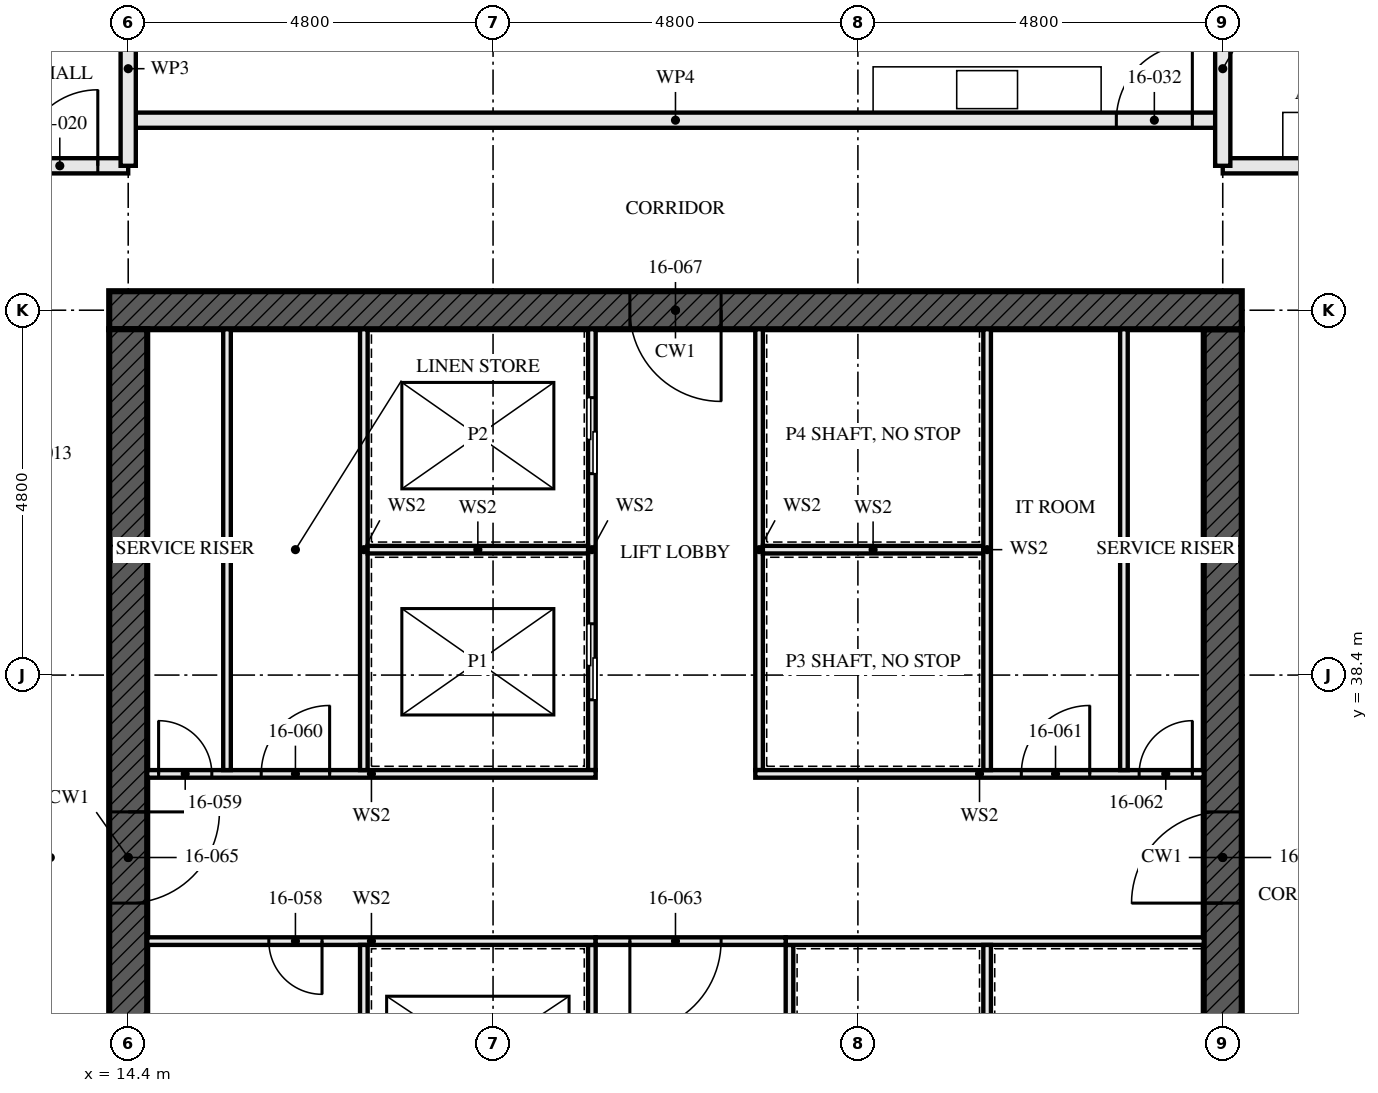
"""IFC4 building model, lengths in metres.
Left out: names, types, materials, properties, quantities, classifications, styles, units other than length and angle.
Written with IfcOpenShell. Run it as: python <this file> out.ifc"""

import sys

from ifc_helpers import new_model, si_unit, direction, frame, frame_2d, origin, place, context, subcontext, project, spatial, rectangle, extrude, element, fill, save


model = new_model("IFC4")
c1 = context("Model", 3, precision=1e-05, world=origin(), true_north=direction((0.0, 1.0)))
c2 = subcontext(c1, "Body", "Model", "MODEL_VIEW")
j1 = project(units=[si_unit("LENGTHUNIT", "METRE"), si_unit("PLANEANGLEUNIT", "RADIAN")], contexts=[c1])
p1 = place(None, origin())
s1 = spatial("IfcSite", under=j1, at=p1, CompositionType="ELEMENT")
p2 = place(p1, origin())
s2 = spatial("IfcBuilding", under=s1, at=p2, CompositionType="ELEMENT")
p3 = place(p2, frame((0.0, 0.0, 62.0)))
s3 = spatial("IfcBuildingStorey", under=s2, at=p3, CompositionType="ELEMENT", Elevation=62.0)
p4 = place(p3, frame((29.05, 43.2, -0.17), z_axis=(0.0, 0.0, 1.0), x_axis=(-1.0, 0.0, 0.0)))
e1 = element("IfcWall", 1, at=p4, inside=s3, PredefinedType="SHEAR", context=c2, shape_type="SweptSolid", body=[
    extrude(rectangle(XDim=14.9, YDim=0.5, at=frame_2d((7.45, 0.0))), origin(), (0.0, 0.0, 1.0), 3.5),
])
p5 = place(p4, frame((6.85, 0.0, 0.17)))
e2 = element("IfcOpeningElement", 2, at=p5, cuts=e1, PredefinedType="OPENING", context=c2, shape_type="SweptSolid", body=[
    extrude(rectangle(XDim=1.2, YDim=2.1, at=frame_2d((0.6, 1.05))), frame((0.0, 0.26, 0.0), z_axis=(0.0, -1.0, 0.0), x_axis=(1.0, 0.0, 0.0)), (0.0, 0.0, 1.0), 0.521),
])
p6 = place(p3, frame((14.4, 42.95, -0.17), z_axis=(0.0, 0.0, 1.0), x_axis=(0.0, -1.0, 0.0)))
e3 = element("IfcWall", 3, at=p6, inside=s3, PredefinedType="SHEAR", context=c2, shape_type="SweptSolid", body=[
    extrude(rectangle(XDim=13.9, YDim=0.5, at=frame_2d((6.95, 0.0))), origin(), (0.0, 0.0, 1.0), 3.5),
])
p7 = place(p6, frame((6.35, 0.0, 0.17)))
e4 = element("IfcOpeningElement", 4, at=p7, cuts=e3, PredefinedType="OPENING", context=c2, shape_type="SweptSolid", body=[
    extrude(rectangle(XDim=1.2, YDim=2.1, at=frame_2d((0.6, 1.05))), frame((0.0, 0.26, 0.0), z_axis=(0.0, -1.0, 0.0), x_axis=(1.0, 0.0, 0.0)), (0.0, 0.0, 1.0), 0.521),
])
p8 = place(p3, frame((28.8, 29.05, -0.17), z_axis=(0.0, 0.0, 1.0), x_axis=(0.0, 1.0, 0.0)))
e5 = element("IfcWall", 5, at=p8, inside=s3, PredefinedType="SHEAR", context=c2, shape_type="SweptSolid", body=[
    extrude(rectangle(XDim=13.9, YDim=0.5, at=frame_2d((6.95, 0.0))), origin(), (0.0, 0.0, 1.0), 3.5),
])
p9 = place(p8, frame((6.35, 0.0, 0.17)))
e6 = element("IfcOpeningElement", 6, at=p9, cuts=e5, PredefinedType="OPENING", context=c2, shape_type="SweptSolid", body=[
    extrude(rectangle(XDim=1.2, YDim=2.1, at=frame_2d((0.6, 1.05))), frame((0.0, 0.26, 0.0), z_axis=(0.0, -1.0, 0.0), x_axis=(1.0, 0.0, 0.0)), (0.0, 0.0, 1.0), 0.521),
])
p10 = place(p3, frame((14.4, 45.1, 0.0), z_axis=(0.0, 0.0, 1.0), x_axis=(-1.0, 0.0, 0.0)))
e7 = element("IfcWall", 7, at=p10, inside=s3, PredefinedType="PARTITIONING", context=c2, shape_type="SweptSolid", body=[
    extrude(rectangle(XDim=9.6, YDim=0.2, at=frame_2d((4.8, 0.0))), origin(), (0.0, 0.0, 1.0), 3.33),
])
p11 = place(p10, frame((0.4, 0.0, 0.0)))
e8 = element("IfcOpeningElement", 8, at=p11, cuts=e7, PredefinedType="OPENING", context=c2, shape_type="SweptSolid", body=[
    extrude(rectangle(XDim=1.0, YDim=2.1, at=frame_2d((0.5, 1.05))), frame((0.0, 0.111, 0.0), z_axis=(0.0, -1.0, 0.0), x_axis=(1.0, 0.0, 0.0)), (0.0, 0.0, 1.0), 0.221),
])
p12 = place(p3, frame((28.8, 45.7, 0.0), z_axis=(0.0, 0.0, 1.0), x_axis=(-1.0, 0.0, 0.0)))
e9 = element("IfcWall", 9, at=p12, inside=s3, PredefinedType="PARTITIONING", context=c2, shape_type="SweptSolid", body=[
    extrude(rectangle(XDim=14.4, YDim=0.2, at=frame_2d((7.2, 0.0))), origin(), (0.0, 0.0, 1.0), 3.33),
])
p13 = place(p12, frame((0.4, 0.0, 0.0)))
e10 = element("IfcOpeningElement", 10, at=p13, cuts=e9, PredefinedType="OPENING", context=c2, shape_type="SweptSolid", body=[
    extrude(rectangle(XDim=1.0, YDim=2.1, at=frame_2d((0.5, 1.05))), frame((0.0, 0.111, 0.0), z_axis=(0.0, -1.0, 0.0), x_axis=(1.0, 0.0, 0.0)), (0.0, 0.0, 1.0), 0.221),
])
p14 = place(p3, frame((38.4, 45.1, 0.0), z_axis=(0.0, 0.0, 1.0), x_axis=(-1.0, 0.0, 0.0)))
e11 = element("IfcWall", 11, at=p14, inside=s3, PredefinedType="PARTITIONING", context=c2, shape_type="SweptSolid", body=[
    extrude(rectangle(XDim=9.6, YDim=0.2, at=frame_2d((4.8, 0.0))), origin(), (0.0, 0.0, 1.0), 3.33),
])
p15 = place(p14, frame((0.4, 0.0, 0.0)))
e12 = element("IfcOpeningElement", 12, at=p15, cuts=e11, PredefinedType="OPENING", context=c2, shape_type="SweptSolid", body=[
    extrude(rectangle(XDim=1.0, YDim=2.1, at=frame_2d((0.5, 1.05))), frame((0.0, 0.111, 0.0), z_axis=(0.0, -1.0, 0.0), x_axis=(1.0, 0.0, 0.0)), (0.0, 0.0, 1.0), 0.221),
])
for number, where, z_axis, x_axis in (
    (13, (15.7, 37.15, 0.0), (0.0, 0.0, 1.0), (0.0, 1.0, 0.0)),
    (14, (27.5, 37.15, 0.0), (0.0, 0.0, 1.0), (0.0, 1.0, 0.0)),
):
    element("IfcWall", number, at=place(p3, frame(where, z_axis=z_axis, x_axis=x_axis)), inside=s3, PredefinedType="SOLIDWALL", context=c2, shape_type="SweptSolid", body=[
        extrude(rectangle(XDim=5.8, YDim=0.1, at=frame_2d((2.9, 0.0))), origin(), (0.0, 0.0, 1.0), 3.33),
    ])
p16 = place(p3, frame((20.5, 29.05, 0.0), z_axis=(0.0, 0.0, 1.0), x_axis=(0.0, 1.0, 0.0)))
e15 = element("IfcWall", 15, at=p16, inside=s3, PredefinedType="SOLIDWALL", context=c2, shape_type="SweptSolid", body=[
    extrude(rectangle(XDim=5.8, YDim=0.1, at=frame_2d((2.9, 0.0))), origin(), (0.0, 0.0, 1.0), 3.33),
])
p17 = place(p16, frame((0.8, 0.0, 0.0)))
e16 = element("IfcOpeningElement", 16, at=p17, cuts=e15, PredefinedType="OPENING", context=c2, shape_type="SweptSolid", body=[
    extrude(rectangle(XDim=1.1, YDim=2.3, at=frame_2d((0.55, 1.15))), frame((0.0, 0.061, 0.0), z_axis=(0.0, -1.0, 0.0), x_axis=(1.0, 0.0, 0.0)), (0.0, 0.0, 1.0), 0.121),
])
p18 = place(p16, frame((3.775, 0.0, 0.0)))
e17 = element("IfcOpeningElement", 17, at=p18, cuts=e15, PredefinedType="OPENING", context=c2, shape_type="SweptSolid", body=[
    extrude(rectangle(XDim=1.1, YDim=2.3, at=frame_2d((0.55, 1.15))), frame((0.0, 0.061, 0.0), z_axis=(0.0, -1.0, 0.0), x_axis=(1.0, 0.0, 0.0)), (0.0, 0.0, 1.0), 0.121),
])
p19 = place(p3, frame((20.5, 37.15, 0.0), z_axis=(0.0, 0.0, 1.0), x_axis=(0.0, 1.0, 0.0)))
e18 = element("IfcWall", 18, at=p19, inside=s3, PredefinedType="SOLIDWALL", context=c2, shape_type="SweptSolid", body=[
    extrude(rectangle(XDim=5.8, YDim=0.1, at=frame_2d((2.9, 0.0))), origin(), (0.0, 0.0, 1.0), 3.33),
])
p20 = place(p19, frame((0.925, 0.0, 0.0)))
e19 = element("IfcOpeningElement", 19, at=p20, cuts=e18, PredefinedType="OPENING", context=c2, shape_type="SweptSolid", body=[
    extrude(rectangle(XDim=1.0, YDim=2.1, at=frame_2d((0.5, 1.05))), frame((0.0, 0.061, 0.0), z_axis=(0.0, -1.0, 0.0), x_axis=(1.0, 0.0, 0.0)), (0.0, 0.0, 1.0), 0.121),
])
p21 = place(p19, frame((3.9, 0.0, 0.0)))
e20 = element("IfcOpeningElement", 20, at=p21, cuts=e18, PredefinedType="OPENING", context=c2, shape_type="SweptSolid", body=[
    extrude(rectangle(XDim=1.0, YDim=2.1, at=frame_2d((0.5, 1.05))), frame((0.0, 0.061, 0.0), z_axis=(0.0, -1.0, 0.0), x_axis=(1.0, 0.0, 0.0)), (0.0, 0.0, 1.0), 0.121),
])
p22 = place(p3, frame((22.7, 37.15, 0.0), z_axis=(0.0, 0.0, 1.0), x_axis=(0.0, 1.0, 0.0)))
e21 = element("IfcWall", 21, at=p22, inside=s3, PredefinedType="SOLIDWALL", context=c2, shape_type="SweptSolid", body=[
    extrude(rectangle(XDim=5.8, YDim=0.1, at=frame_2d((2.9, 0.0))), origin(), (0.0, 0.0, 1.0), 3.33),
])
p23 = place(p3, frame((23.1, 29.05, 0.0), z_axis=(0.0, 0.0, 1.0), x_axis=(0.0, 1.0, 0.0)))
e22 = element("IfcWall", 22, at=p23, inside=s3, PredefinedType="SOLIDWALL", context=c2, shape_type="SweptSolid", body=[
    extrude(rectangle(XDim=5.8, YDim=0.1, at=frame_2d((2.9, 0.0))), origin(), (0.0, 0.0, 1.0), 3.33),
])
p24 = place(p23, frame((1.0, 0.0, 0.0)))
e23 = element("IfcOpeningElement", 23, at=p24, cuts=e22, PredefinedType="OPENING", context=c2, shape_type="SweptSolid", body=[
    extrude(rectangle(XDim=0.7, YDim=2.1, at=frame_2d((0.35, 1.05))), frame((0.0, 0.061, 0.0), z_axis=(0.0, -1.0, 0.0), x_axis=(1.0, 0.0, 0.0)), (0.0, 0.0, 1.0), 0.121),
])
p25 = place(p3, frame((14.65, 34.9, 0.0), z_axis=(0.0, 0.0, 1.0), x_axis=(1.0, 0.0, 0.0)))
e24 = element("IfcWall", 24, at=p25, inside=s3, PredefinedType="SOLIDWALL", context=c2, shape_type="SweptSolid", body=[
    extrude(rectangle(XDim=5.9, YDim=0.1, at=frame_2d((2.95, 0.0))), origin(), (0.0, 0.0, 1.0), 3.33),
])
p26 = place(p25, frame((1.6, 0.0, 0.0)))
e25 = element("IfcOpeningElement", 25, at=p26, cuts=e24, PredefinedType="OPENING", context=c2, shape_type="SweptSolid", body=[
    extrude(rectangle(XDim=0.7, YDim=2.1, at=frame_2d((0.35, 1.05))), frame((0.0, 0.061, 0.0), z_axis=(0.0, -1.0, 0.0), x_axis=(1.0, 0.0, 0.0)), (0.0, 0.0, 1.0), 0.121),
])
p27 = place(p3, frame((23.05, 34.9, 0.0), z_axis=(0.0, 0.0, 1.0), x_axis=(1.0, 0.0, 0.0)))
e26 = element("IfcWall", 26, at=p27, inside=s3, PredefinedType="SOLIDWALL", context=c2, shape_type="SweptSolid", body=[
    extrude(rectangle(XDim=5.5, YDim=0.1, at=frame_2d((2.75, 0.0))), origin(), (0.0, 0.0, 1.0), 3.33),
])
p28 = place(p3, frame((14.65, 37.1, 0.0), z_axis=(0.0, 0.0, 1.0), x_axis=(1.0, 0.0, 0.0)))
e27 = element("IfcWall", 27, at=p28, inside=s3, PredefinedType="SOLIDWALL", context=c2, shape_type="SweptSolid", body=[
    extrude(rectangle(XDim=5.9, YDim=0.1, at=frame_2d((2.95, 0.0))), origin(), (0.0, 0.0, 1.0), 3.33),
])
p29 = place(p28, frame((0.15, 0.0, 0.0)))
e28 = element("IfcOpeningElement", 28, at=p29, cuts=e27, PredefinedType="OPENING", context=c2, shape_type="SweptSolid", body=[
    extrude(rectangle(XDim=0.7, YDim=2.1, at=frame_2d((0.35, 1.05))), frame((0.0, 0.061, 0.0), z_axis=(0.0, -1.0, 0.0), x_axis=(1.0, 0.0, 0.0)), (0.0, 0.0, 1.0), 0.121),
])
p30 = place(p28, frame((1.5, 0.0, 0.0)))
e29 = element("IfcOpeningElement", 29, at=p30, cuts=e27, PredefinedType="OPENING", context=c2, shape_type="SweptSolid", body=[
    extrude(rectangle(XDim=0.9, YDim=2.1, at=frame_2d((0.45, 1.05))), frame((0.0, 0.061, 0.0), z_axis=(0.0, -1.0, 0.0), x_axis=(1.0, 0.0, 0.0)), (0.0, 0.0, 1.0), 0.121),
])
p31 = place(p3, frame((22.65, 37.1, 0.0), z_axis=(0.0, 0.0, 1.0), x_axis=(1.0, 0.0, 0.0)))
e30 = element("IfcWall", 30, at=p31, inside=s3, PredefinedType="SOLIDWALL", context=c2, shape_type="SweptSolid", body=[
    extrude(rectangle(XDim=5.9, YDim=0.1, at=frame_2d((2.95, 0.0))), origin(), (0.0, 0.0, 1.0), 3.33),
])
p32 = place(p31, frame((3.5, 0.0, 0.0)))
e31 = element("IfcOpeningElement", 31, at=p32, cuts=e30, PredefinedType="OPENING", context=c2, shape_type="SweptSolid", body=[
    extrude(rectangle(XDim=0.9, YDim=2.1, at=frame_2d((0.45, 1.05))), frame((0.0, 0.061, 0.0), z_axis=(0.0, -1.0, 0.0), x_axis=(1.0, 0.0, 0.0)), (0.0, 0.0, 1.0), 0.121),
])
p33 = place(p31, frame((5.05, 0.0, 0.0)))
e32 = element("IfcOpeningElement", 32, at=p33, cuts=e30, PredefinedType="OPENING", context=c2, shape_type="SweptSolid", body=[
    extrude(rectangle(XDim=0.7, YDim=2.1, at=frame_2d((0.35, 1.05))), frame((0.0, 0.061, 0.0), z_axis=(0.0, -1.0, 0.0), x_axis=(1.0, 0.0, 0.0)), (0.0, 0.0, 1.0), 0.121),
])
p34 = place(p3, frame((20.55, 34.9, 0.0), z_axis=(0.0, 0.0, 1.0), x_axis=(1.0, 0.0, 0.0)))
e33 = element("IfcWall", 33, at=p34, inside=s3, PredefinedType="SOLIDWALL", context=c2, shape_type="SweptSolid", body=[
    extrude(rectangle(XDim=2.5, YDim=0.1, at=frame_2d((1.25, 0.0))), origin(), (0.0, 0.0, 1.0), 3.33),
])
p35 = place(p34, frame((0.45, 0.0, 0.0)))
e34 = element("IfcOpeningElement", 34, at=p35, cuts=e33, PredefinedType="OPENING", context=c2, shape_type="SweptSolid", body=[
    extrude(rectangle(XDim=1.2, YDim=2.1, at=frame_2d((0.6, 1.05))), frame((0.0, 0.061, 0.0), z_axis=(0.0, -1.0, 0.0), x_axis=(1.0, 0.0, 0.0)), (0.0, 0.0, 1.0), 0.121),
])
for number, where, z_axis, x_axis in (
    (35, (17.5, 29.05, 0.0), (0.0, 0.0, 1.0), (0.0, 1.0, 0.0)),
    (36, (17.5, 37.15, 0.0), (0.0, 0.0, 1.0), (0.0, 1.0, 0.0)),
):
    element("IfcWall", number, at=place(p3, frame(where, z_axis=z_axis, x_axis=x_axis)), inside=s3, PredefinedType="SOLIDWALL", context=c2, shape_type="SweptSolid", body=[
        extrude(rectangle(XDim=5.8, YDim=0.1, at=frame_2d((2.9, 0.0))), origin(), (0.0, 0.0, 1.0), 3.33),
    ])
for number, where, z_axis, x_axis in (
    (37, (17.55, 40.05, 0.0), (0.0, 0.0, 1.0), (1.0, 0.0, 0.0)),
    (38, (22.75, 40.05, 0.0), (0.0, 0.0, 1.0), (1.0, 0.0, 0.0)),
):
    element("IfcWall", number, at=place(p3, frame(where, z_axis=z_axis, x_axis=x_axis)), inside=s3, PredefinedType="SOLIDWALL", context=c2, shape_type="SweptSolid", body=[
        extrude(rectangle(XDim=2.9, YDim=0.1, at=frame_2d((1.45, 0.0))), origin(), (0.0, 0.0, 1.0), 3.33),
    ])
p36 = place(p3, frame((25.7, 37.15, 0.0), z_axis=(0.0, 0.0, 1.0), x_axis=(0.0, 1.0, 0.0)))
e39 = element("IfcWall", 39, at=p36, inside=s3, PredefinedType="SOLIDWALL", context=c2, shape_type="SweptSolid", body=[
    extrude(rectangle(XDim=5.8, YDim=0.1, at=frame_2d((2.9, 0.0))), origin(), (0.0, 0.0, 1.0), 3.33),
])
p37 = place(p3, frame((25.7, 31.95, 0.0), z_axis=(0.0, 0.0, 1.0), x_axis=(0.0, 1.0, 0.0)))
e40 = element("IfcWall", 40, at=p37, inside=s3, PredefinedType="SOLIDWALL", context=c2, shape_type="SweptSolid", body=[
    extrude(rectangle(XDim=2.9, YDim=0.1, at=frame_2d((1.45, 0.0))), origin(), (0.0, 0.0, 1.0), 3.33),
])
for number, where, z_axis, x_axis in (
    (41, (14.4, 45.1, 0.0), (0.0, 0.0, 1.0), (0.0, 1.0, 0.0)),
    (42, (28.8, 45.1, 0.0), (0.0, 0.0, 1.0), (0.0, 1.0, 0.0)),
):
    element("IfcWall", number, at=place(p3, frame(where, z_axis=z_axis, x_axis=x_axis)), inside=s3, PredefinedType="PARTITIONING", context=c2, shape_type="SweptSolid", body=[
        extrude(rectangle(XDim=2.555, YDim=0.2, at=frame_2d((1.277, 0.0))), origin(), (0.0, 0.0, 1.0), 2.32),
    ])
p38 = place(p11, frame((1.0, 0.0, 0.0), z_axis=(0.0, 0.0, 1.0), x_axis=(-1.0, 0.0, 0.0)))
e43 = element("IfcDoor", 43, at=p38, inside=s3, OperationType="SINGLE_SWING_LEFT", PredefinedType="DOOR", context=c2, shape_type="SweptSolid", body=[
    extrude(rectangle(XDim=1.0, YDim=2.1, at=frame_2d((0.5, 1.05))), frame((0.0, 0.027, 0.0), z_axis=(0.0, -1.0, 0.0), x_axis=(1.0, 0.0, 0.0)), (0.0, 0.0, 1.0), 0.054),
])
fill(e8, e43)
p39 = place(p13, frame((1.0, 0.0, 0.0), z_axis=(0.0, 0.0, 1.0), x_axis=(-1.0, 0.0, 0.0)))
e44 = element("IfcDoor", 44, at=p39, inside=s3, OperationType="SINGLE_SWING_LEFT", PredefinedType="DOOR", context=c2, shape_type="SweptSolid", body=[
    extrude(rectangle(XDim=1.0, YDim=2.1, at=frame_2d((0.5, 1.05))), frame((0.0, 0.027, 0.0), z_axis=(0.0, -1.0, 0.0), x_axis=(1.0, 0.0, 0.0)), (0.0, 0.0, 1.0), 0.054),
])
fill(e10, e44)
p40 = place(p20, origin())
e45 = element("IfcDoor", 45, at=p40, inside=s3, OperationType="SLIDING_TO_LEFT", PredefinedType="DOOR", context=c2, shape_type="SweptSolid", body=[
    extrude(rectangle(XDim=1.0, YDim=2.1, at=frame_2d((0.5, 1.05))), frame((0.0, 0.05, 0.0), z_axis=(0.0, -1.0, 0.0), x_axis=(1.0, 0.0, 0.0)), (0.0, 0.0, 1.0), 0.1),
])
fill(e19, e45)
p41 = place(p21, origin())
e46 = element("IfcDoor", 46, at=p41, inside=s3, OperationType="SLIDING_TO_LEFT", PredefinedType="DOOR", context=c2, shape_type="SweptSolid", body=[
    extrude(rectangle(XDim=1.0, YDim=2.1, at=frame_2d((0.5, 1.05))), frame((0.0, 0.05, 0.0), z_axis=(0.0, -1.0, 0.0), x_axis=(1.0, 0.0, 0.0)), (0.0, 0.0, 1.0), 0.1),
])
fill(e20, e46)
p42 = place(p26, frame((0.7, 0.0, 0.0), z_axis=(0.0, 0.0, 1.0), x_axis=(-1.0, 0.0, 0.0)))
e47 = element("IfcDoor", 47, at=p42, inside=s3, OperationType="SINGLE_SWING_RIGHT", PredefinedType="DOOR", context=c2, shape_type="SweptSolid", body=[
    extrude(rectangle(XDim=0.7, YDim=2.1, at=frame_2d((0.35, 1.05))), frame((0.0, 0.027, 0.0), z_axis=(0.0, -1.0, 0.0), x_axis=(1.0, 0.0, 0.0)), (0.0, 0.0, 1.0), 0.054),
])
fill(e25, e47)
p43 = place(p29, origin())
e48 = element("IfcDoor", 48, at=p43, inside=s3, OperationType="SINGLE_SWING_RIGHT", PredefinedType="DOOR", context=c2, shape_type="SweptSolid", body=[
    extrude(rectangle(XDim=0.7, YDim=2.1, at=frame_2d((0.35, 1.05))), frame((0.0, 0.027, 0.0), z_axis=(0.0, -1.0, 0.0), x_axis=(1.0, 0.0, 0.0)), (0.0, 0.0, 1.0), 0.054),
])
fill(e28, e48)
p44 = place(p30, origin())
e49 = element("IfcDoor", 49, at=p44, inside=s3, OperationType="SINGLE_SWING_LEFT", PredefinedType="DOOR", context=c2, shape_type="SweptSolid", body=[
    extrude(rectangle(XDim=0.9, YDim=2.1, at=frame_2d((0.45, 1.05))), frame((0.0, 0.027, 0.0), z_axis=(0.0, -1.0, 0.0), x_axis=(1.0, 0.0, 0.0)), (0.0, 0.0, 1.0), 0.054),
])
fill(e29, e49)
p45 = place(p32, origin())
e50 = element("IfcDoor", 50, at=p45, inside=s3, OperationType="SINGLE_SWING_LEFT", PredefinedType="DOOR", context=c2, shape_type="SweptSolid", body=[
    extrude(rectangle(XDim=0.9, YDim=2.1, at=frame_2d((0.45, 1.05))), frame((0.0, 0.027, 0.0), z_axis=(0.0, -1.0, 0.0), x_axis=(1.0, 0.0, 0.0)), (0.0, 0.0, 1.0), 0.054),
])
fill(e31, e50)
p46 = place(p33, origin())
e51 = element("IfcDoor", 51, at=p46, inside=s3, OperationType="SINGLE_SWING_LEFT", PredefinedType="DOOR", context=c2, shape_type="SweptSolid", body=[
    extrude(rectangle(XDim=0.7, YDim=2.1, at=frame_2d((0.35, 1.05))), frame((0.0, 0.027, 0.0), z_axis=(0.0, -1.0, 0.0), x_axis=(1.0, 0.0, 0.0)), (0.0, 0.0, 1.0), 0.054),
])
fill(e32, e51)
p47 = place(p35, frame((1.2, 0.0, 0.0), z_axis=(0.0, 0.0, 1.0), x_axis=(-1.0, 0.0, 0.0)))
e52 = element("IfcDoor", 52, at=p47, inside=s3, OperationType="SINGLE_SWING_LEFT", PredefinedType="DOOR", context=c2, shape_type="SweptSolid", body=[
    extrude(rectangle(XDim=1.2, YDim=2.1, at=frame_2d((0.6, 1.05))), frame((0.0, 0.027, 0.0), z_axis=(0.0, -1.0, 0.0), x_axis=(1.0, 0.0, 0.0)), (0.0, 0.0, 1.0), 0.054),
])
fill(e34, e52)
p48 = place(p7, origin())
e53 = element("IfcDoor", 53, at=p48, inside=s3, OperationType="SINGLE_SWING_LEFT", PredefinedType="DOOR", context=c2, shape_type="SweptSolid", body=[
    extrude(rectangle(XDim=1.2, YDim=2.1, at=frame_2d((0.6, 1.05))), frame((0.0, 0.027, 0.0), z_axis=(0.0, -1.0, 0.0), x_axis=(1.0, 0.0, 0.0)), (0.0, 0.0, 1.0), 0.054),
])
fill(e4, e53)
p49 = place(p9, origin())
e54 = element("IfcDoor", 54, at=p49, inside=s3, OperationType="SINGLE_SWING_LEFT", PredefinedType="DOOR", context=c2, shape_type="SweptSolid", body=[
    extrude(rectangle(XDim=1.2, YDim=2.1, at=frame_2d((0.6, 1.05))), frame((0.0, 0.027, 0.0), z_axis=(0.0, -1.0, 0.0), x_axis=(1.0, 0.0, 0.0)), (0.0, 0.0, 1.0), 0.054),
])
fill(e6, e54)
p50 = place(p5, origin())
e55 = element("IfcDoor", 55, at=p50, inside=s3, OperationType="SINGLE_SWING_LEFT", PredefinedType="DOOR", context=c2, shape_type="SweptSolid", body=[
    extrude(rectangle(XDim=1.2, YDim=2.1, at=frame_2d((0.6, 1.05))), frame((0.0, 0.027, 0.0), z_axis=(0.0, -1.0, 0.0), x_axis=(1.0, 0.0, 0.0)), (0.0, 0.0, 1.0), 0.054),
])
fill(e2, e55)
save(model, sys.argv[1])
